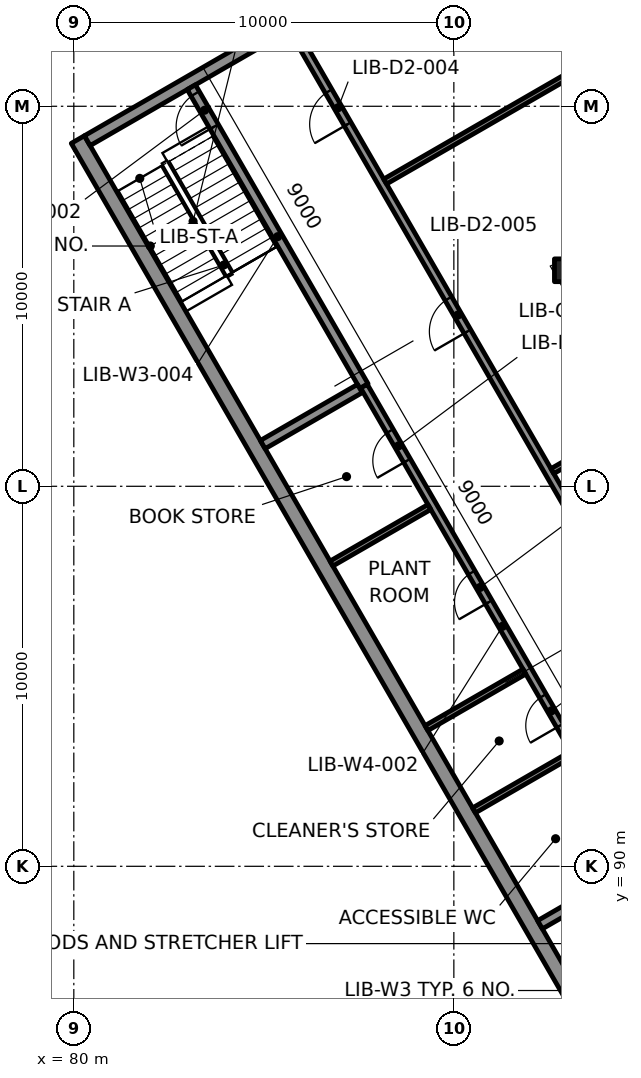
"""IFC4 building model, lengths in metres.
Left out: names, types, materials, properties, quantities, classifications, styles, units other than length and angle.
Written with IfcOpenShell. Run it as: python <this file> out.ifc"""

import sys

from ifc_helpers import new_model, si_unit, direction, frame, frame_2d, origin, origin_2d, place, context, subcontext, project, spatial, rectangle, extrude, element, fill, save


model = new_model("IFC4")
c1 = context("Model", 3, precision=1e-05, world=origin(), true_north=direction((0.0, 1.0)))
c2 = subcontext(c1, "Body", "Model", "MODEL_VIEW")
j1 = project(units=[si_unit("LENGTHUNIT", "METRE"), si_unit("PLANEANGLEUNIT", "RADIAN")], contexts=[c1])
p1 = place(None, origin())
s1 = spatial("IfcSite", under=j1, at=p1, CompositionType="ELEMENT")
p2 = place(p1, origin())
s2 = spatial("IfcBuilding", under=s1, at=p2, CompositionType="ELEMENT")
p3 = place(p2, frame((0.0, 0.0, 8.0)))
s3 = spatial("IfcBuildingStorey", under=s2, at=p3, CompositionType="ELEMENT", Elevation=8.0)
for number, where, z_axis, x_axis in (
    (1, (87.421, 93.256, -0.0), (0.0, 0.0, 1.0), (-0.5, 0.866, 0.0)),
    (2, (82.621, 101.57, -0.0), (0.0, 0.0, 1.0), (-0.5, 0.866, 0.0)),
):
    element("IfcColumn", number, at=place(p3, frame(where, z_axis=z_axis, x_axis=x_axis)), inside=s3, PredefinedType="COLUMN", context=c2, shape_type="SweptSolid", body=[
        extrude(rectangle(XDim=1.2, YDim=1.5, at=origin_2d()), origin(), (0.0, 0.0, 1.0), 4.601),
    ])
p4 = place(p3, frame((81.775, 87.5, 0.0), z_axis=(0.0, 0.0, 1.0), x_axis=(1.0, 0.0, 0.0)))
e3 = element("IfcWall", 3, at=p4, inside=s3, PredefinedType="PARTITIONING", context=c2, shape_type="SweptSolid", body=[
    extrude(rectangle(XDim=9.662, YDim=0.15, at=frame_2d((4.831, 0.0))), origin(), (0.0, 0.0, 1.0), 3.465),
])
p5 = place(p4, frame((4.381, 0.0, 0.0)))
e4 = element("IfcOpeningElement", 4, at=p5, cuts=e3, PredefinedType="OPENING", context=c2, shape_type="SweptSolid", body=[
    extrude(rectangle(XDim=0.9, YDim=2.1, at=frame_2d((0.45, 1.05))), frame((0.0, 0.085, 0.0), z_axis=(0.0, -1.0, 0.0), x_axis=(1.0, 0.0, 0.0)), (0.0, 0.0, 1.0), 0.17),
])
p6 = place(p3, frame((75.975, 98.1, 0.0), z_axis=(0.0, 0.0, 1.0), x_axis=(1.0, 0.0, 0.0)))
e5 = element("IfcWall", 5, at=p6, inside=s3, PredefinedType="PARTITIONING", context=c2, shape_type="SweptSolid", body=[
    extrude(rectangle(XDim=5.649, YDim=0.15, at=frame_2d((2.825, 0.0))), origin(), (0.0, 0.0, 1.0), 3.7),
])
p7 = place(p6, frame((2.375, 0.0, 0.0)))
e6 = element("IfcOpeningElement", 6, at=p7, cuts=e5, PredefinedType="OPENING", context=c2, shape_type="SweptSolid", body=[
    extrude(rectangle(XDim=0.9, YDim=2.1, at=frame_2d((0.45, 1.05))), frame((0.0, 0.085, 0.0), z_axis=(0.0, -1.0, 0.0), x_axis=(1.0, 0.0, 0.0)), (0.0, 0.0, 1.0), 0.17),
])
p8 = place(p3, frame((81.801, 92.783, 0.0), z_axis=(0.0, 0.0, 1.0), x_axis=(0.866019294229, 0.500010581911, 0.0)))
e7 = element("IfcWall", 7, at=p8, inside=s3, PredefinedType="PARTITIONING", context=c2, shape_type="SweptSolid", body=[
    extrude(rectangle(XDim=6.063, YDim=0.1, at=frame_2d((3.032, 0.0))), origin(), (0.0, 0.0, 1.0), 3.465),
])
p9 = place(p3, frame((91.5, 85.219, 0.0), z_axis=(0.0, 0.0, 1.0), x_axis=(0.0, 1.0, 0.0)))
e8 = element("IfcWall", 8, at=p9, inside=s3, PredefinedType="PARTITIONING", context=c2, shape_type="SweptSolid", body=[
    extrude(rectangle(XDim=2.17, YDim=0.15, at=frame_2d((1.085, 0.0))), origin(), (0.0, 0.0, 1.0), 3.465),
])
p10 = place(p3, frame((81.7, 87.5, 0.0), z_axis=(0.0, 0.0, 1.0), x_axis=(0.0, 1.0, 0.0)))
e9 = element("IfcWall", 9, at=p10, inside=s3, PredefinedType="PARTITIONING", context=c2, shape_type="SweptSolid", body=[
    extrude(rectangle(XDim=10.6, YDim=0.15, at=frame_2d((5.3, 0.0))), origin(), (0.0, 0.0, 1.0), 3.7),
])
p11 = place(p3, frame((92.947, 105.684, -0.36), z_axis=(0.0, 0.0, 1.0), x_axis=(1.0, 0.0, 0.0)))
e10 = element("IfcColumn", 10, at=p11, inside=s3, PredefinedType="COLUMN", context=c2, shape_type="SweptSolid", body=[
    extrude(rectangle(XDim=0.6, YDim=0.6, at=origin_2d()), origin(), (0.0, 0.0, 1.0), 4.6),
])
p12 = place(p3, frame((107.106, 62.36, 0.0), z_axis=(0.0, 0.0, 1.0), x_axis=(-0.49999992739, 0.866025445706, 0.0)))
e11 = element("IfcWall", 11, at=p12, inside=s3, PredefinedType="SOLIDWALL", context=c2, shape_type="SweptSolid", body=[
    extrude(rectangle(XDim=54.0, YDim=0.4, at=frame_2d((27.0, 0.0))), origin(), (0.0, 0.0, 1.0), 4.24),
])
p13 = place(p3, frame((80.354, 109.095, 0.0), z_axis=(0.0, 0.0, 1.0), x_axis=(0.866026568746, 0.499997982221, 0.0)))
e12 = element("IfcWall", 12, at=p13, inside=s3, PredefinedType="SOLIDWALL", context=c2, shape_type="SweptSolid", body=[
    extrude(rectangle(XDim=29.3, YDim=0.3, at=frame_2d((14.65, 0.0))), origin(), (0.0, 0.0, 1.0), 4.24),
])
p14 = place(p3, frame((87.635, 102.635, 0.0), z_axis=(0.0, 0.0, 1.0), x_axis=(-0.499994616197, 0.866028512102, 0.0)))
e13 = element("IfcWall", 13, at=p14, inside=s3, PredefinedType="SOLIDWALL", context=c2, shape_type="SweptSolid", body=[
    extrude(rectangle(XDim=9.085, YDim=0.25, at=frame_2d((4.542, 0.0))), origin(), (0.0, 0.0, 1.0), 4.24),
])
p15 = place(p14, frame((7.885, 0.0, 0.0)))
e14 = element("IfcOpeningElement", 14, at=p15, cuts=e13, PredefinedType="OPENING", context=c2, shape_type="SweptSolid", body=[
    extrude(rectangle(XDim=1.0, YDim=2.1, at=frame_2d((0.5, 1.05))), frame((0.0, 0.135, 0.0), z_axis=(0.0, -1.0, 0.0), x_axis=(1.0, 0.0, 0.0)), (0.0, 0.0, 1.0), 0.27),
])
p16 = place(p3, frame((94.93, 90.0, 0.0), z_axis=(0.0, 0.0, 1.0), x_axis=(-0.499997667785, 0.866026750285, 0.0)))
e15 = element("IfcWall", 15, at=p16, inside=s3, PredefinedType="PARTITIONING", context=c2, shape_type="SweptSolid", body=[
    extrude(rectangle(XDim=14.59, YDim=0.2, at=frame_2d((7.295, 0.0))), origin(), (0.0, 0.0, 1.0), 4.24),
])
p17 = place(p16, frame((1.235, 0.0, 0.0)))
e16 = element("IfcOpeningElement", 16, at=p17, cuts=e15, PredefinedType="OPENING", context=c2, shape_type="SweptSolid", body=[
    extrude(rectangle(XDim=1.0, YDim=2.1, at=frame_2d((0.5, 1.05))), frame((0.0, 0.11, 0.0), z_axis=(0.0, -1.0, 0.0), x_axis=(1.0, 0.0, 0.0)), (0.0, 0.0, 1.0), 0.22),
])
p18 = place(p16, frame((4.275, 0.0, 0.0)))
e17 = element("IfcOpeningElement", 17, at=p18, cuts=e15, PredefinedType="OPENING", context=c2, shape_type="SweptSolid", body=[
    extrude(rectangle(XDim=0.9, YDim=2.1, at=frame_2d((0.45, 1.05))), frame((0.0, 0.11, 0.0), z_axis=(0.0, -1.0, 0.0), x_axis=(1.0, 0.0, 0.0)), (0.0, 0.0, 1.0), 0.22),
])
p19 = place(p16, frame((8.025, 0.0, 0.0)))
e18 = element("IfcOpeningElement", 18, at=p19, cuts=e15, PredefinedType="OPENING", context=c2, shape_type="SweptSolid", body=[
    extrude(rectangle(XDim=0.9, YDim=2.1, at=frame_2d((0.45, 1.05))), frame((0.0, 0.11, 0.0), z_axis=(0.0, -1.0, 0.0), x_axis=(1.0, 0.0, 0.0)), (0.0, 0.0, 1.0), 0.22),
])
p20 = place(p16, frame((12.325, 0.0, 0.0)))
e19 = element("IfcOpeningElement", 19, at=p20, cuts=e15, PredefinedType="OPENING", context=c2, shape_type="SweptSolid", body=[
    extrude(rectangle(XDim=0.9, YDim=2.1, at=frame_2d((0.45, 1.05))), frame((0.0, 0.11, 0.0), z_axis=(0.0, -1.0, 0.0), x_axis=(1.0, 0.0, 0.0)), (0.0, 0.0, 1.0), 0.22),
])
p21 = place(p3, frame((92.267, 88.462, 0.0), z_axis=(0.0, 0.0, 1.0), x_axis=(0.866024349092, 0.500001826776, 0.0)))
e20 = element("IfcWall", 20, at=p21, inside=s3, PredefinedType="SOLIDWALL", context=c2, shape_type="SweptSolid", body=[
    extrude(rectangle(XDim=2.95, YDim=0.25, at=frame_2d((1.475, 0.0))), origin(), (0.0, 0.0, 1.0), 4.24),
])
for number, where, z_axis, x_axis in (
    (21, (90.529, 91.471, 0.0), (0.0, 0.0, 1.0), (0.866, 0.5, 0.0)),
    (22, (89.279, 93.636, 0.0), (0.0, 0.0, 1.0), (0.866, 0.5, 0.0)),
):
    element("IfcWall", number, at=place(p3, frame(where, z_axis=z_axis, x_axis=x_axis)), inside=s3, PredefinedType="PARTITIONING", context=c2, shape_type="SweptSolid", body=[
        extrude(rectangle(XDim=2.975, YDim=0.15, at=frame_2d((1.488, 0.0))), origin(), (0.0, 0.0, 1.0), 4.24),
    ])
p22 = place(p3, frame((86.779, 97.967, 0.0), z_axis=(0.0, 0.0, 1.0), x_axis=(0.866053027861, 0.499952150643, 0.0)))
e23 = element("IfcWall", 23, at=p22, inside=s3, PredefinedType="PARTITIONING", context=c2, shape_type="SweptSolid", body=[
    extrude(rectangle(XDim=2.975, YDim=0.15, at=frame_2d((1.487, 0.0))), origin(), (0.0, 0.0, 1.0), 4.24),
])
p23 = place(p3, frame((84.972, 101.097, 0.0), z_axis=(0.0, 0.0, 1.0), x_axis=(0.866039495442, 0.49997559174, 0.0)))
e24 = element("IfcWall", 24, at=p23, inside=s3, PredefinedType="SOLIDWALL", context=c2, shape_type="SweptSolid", body=[
    extrude(rectangle(XDim=2.95, YDim=0.25, at=frame_2d((1.475, 0.0))), origin(), (0.0, 0.0, 1.0), 4.24),
])
p24 = place(p3, frame((112.496, 65.725, 0.0), z_axis=(0.0, 0.0, 1.0), x_axis=(-0.499998673217, 0.866026169802, 0.0)))
e25 = element("IfcWall", 25, at=p24, inside=s3, PredefinedType="PARTITIONING", context=c2, shape_type="SweptSolid", body=[
    extrude(rectangle(XDim=53.48, YDim=0.2, at=frame_2d((26.74, 0.0))), origin(), (0.0, 0.0, 1.0), 4.24),
])
p25 = place(p24, frame((13.08, 0.0, 0.0)))
e26 = element("IfcOpeningElement", 26, at=p25, cuts=e25, PredefinedType="OPENING", context=c2, shape_type="SweptSolid", body=[
    extrude(rectangle(XDim=1.0, YDim=2.1, at=frame_2d((0.5, 1.05))), frame((0.0, 0.11, 0.0), z_axis=(0.0, -1.0, 0.0), x_axis=(1.0, 0.0, 0.0)), (0.0, 0.0, 1.0), 0.22),
])
p26 = place(p24, frame((25.88, 0.0, 0.0)))
e27 = element("IfcOpeningElement", 27, at=p26, cuts=e25, PredefinedType="OPENING", context=c2, shape_type="SweptSolid", body=[
    extrude(rectangle(XDim=1.8, YDim=2.1, at=frame_2d((0.9, 1.05))), frame((0.0, 0.11, 0.0), z_axis=(0.0, -1.0, 0.0), x_axis=(1.0, 0.0, 0.0)), (0.0, 0.0, 1.0), 0.22),
])
p27 = place(p24, frame((50.58, 0.0, 0.0)))
e28 = element("IfcOpeningElement", 28, at=p27, cuts=e25, PredefinedType="OPENING", context=c2, shape_type="SweptSolid", body=[
    extrude(rectangle(XDim=1.0, YDim=2.1, at=frame_2d((0.5, 1.05))), frame((0.0, 0.11, 0.0), z_axis=(0.0, -1.0, 0.0), x_axis=(1.0, 0.0, 0.0)), (0.0, 0.0, 1.0), 0.22),
])
p28 = place(p24, frame((44.28, 0.0, 0.0)))
e29 = element("IfcOpeningElement", 29, at=p28, cuts=e25, PredefinedType="OPENING", context=c2, shape_type="SweptSolid", body=[
    extrude(rectangle(XDim=1.0, YDim=2.1, at=frame_2d((0.5, 1.05))), frame((0.0, 0.11, 0.0), z_axis=(0.0, -1.0, 0.0), x_axis=(1.0, 0.0, 0.0)), (0.0, 0.0, 1.0), 0.22),
])
for number, where, z_axis, x_axis in (
    (30, (92.592, 100.399, 0.0), (0.0, 0.0, 1.0), (0.866, 0.5, 0.0)),
    (31, (88.192, 108.02, 0.0), (0.0, 0.0, 1.0), (0.866, 0.5, 0.0)),
):
    element("IfcWall", number, at=place(p3, frame(where, z_axis=z_axis, x_axis=x_axis)), inside=s3, PredefinedType="PARTITIONING", context=c2, shape_type="SweptSolid", body=[
        extrude(rectangle(XDim=23.05, YDim=0.15, at=frame_2d((11.525, 0.0))), origin(), (0.0, 0.0, 1.0), 4.24),
    ])
p29 = place(p5, origin())
e32 = element("IfcDoor", 32, at=p29, inside=s3, OperationType="SINGLE_SWING_LEFT", PredefinedType="DOOR", context=c2, shape_type="SweptSolid", body=[
    extrude(rectangle(XDim=0.9, YDim=2.1, at=frame_2d((0.45, 1.05))), frame((0.0, 0.025, 0.0), z_axis=(0.0, -1.0, 0.0), x_axis=(1.0, 0.0, 0.0)), (0.0, 0.0, 1.0), 0.05),
])
fill(e4, e32)
p30 = place(p15, origin())
e33 = element("IfcDoor", 33, at=p30, inside=s3, OperationType="SINGLE_SWING_RIGHT", PredefinedType="DOOR", context=c2, shape_type="SweptSolid", body=[
    extrude(rectangle(XDim=1.0, YDim=2.1, at=frame_2d((0.5, 1.05))), frame((0.0, 0.025, 0.0), z_axis=(0.0, -1.0, 0.0), x_axis=(1.0, 0.0, 0.0)), (0.0, 0.0, 1.0), 0.05),
])
fill(e14, e33)
p31 = place(p18, origin())
e34 = element("IfcDoor", 34, at=p31, inside=s3, OperationType="SINGLE_SWING_RIGHT", PredefinedType="DOOR", context=c2, shape_type="SweptSolid", body=[
    extrude(rectangle(XDim=0.9, YDim=2.1, at=frame_2d((0.45, 1.05))), frame((0.0, 0.025, 0.0), z_axis=(0.0, -1.0, 0.0), x_axis=(1.0, 0.0, 0.0)), (0.0, 0.0, 1.0), 0.05),
])
fill(e17, e34)
p32 = place(p19, origin())
e35 = element("IfcDoor", 35, at=p32, inside=s3, OperationType="SINGLE_SWING_RIGHT", PredefinedType="DOOR", context=c2, shape_type="SweptSolid", body=[
    extrude(rectangle(XDim=0.9, YDim=2.1, at=frame_2d((0.45, 1.05))), frame((0.0, 0.025, 0.0), z_axis=(0.0, -1.0, 0.0), x_axis=(1.0, 0.0, 0.0)), (0.0, 0.0, 1.0), 0.05),
])
fill(e18, e35)
p33 = place(p20, origin())
e36 = element("IfcDoor", 36, at=p33, inside=s3, OperationType="SINGLE_SWING_LEFT", PredefinedType="DOOR", context=c2, shape_type="SweptSolid", body=[
    extrude(rectangle(XDim=0.9, YDim=2.1, at=frame_2d((0.45, 1.05))), frame((0.0, 0.025, 0.0), z_axis=(0.0, -1.0, 0.0), x_axis=(1.0, 0.0, 0.0)), (0.0, 0.0, 1.0), 0.05),
])
fill(e19, e36)
p34 = place(p27, origin())
e37 = element("IfcDoor", 37, at=p34, inside=s3, OperationType="SINGLE_SWING_LEFT", PredefinedType="DOOR", context=c2, shape_type="SweptSolid", body=[
    extrude(rectangle(XDim=1.0, YDim=2.1, at=frame_2d((0.5, 1.05))), frame((0.0, 0.025, 0.0), z_axis=(0.0, -1.0, 0.0), x_axis=(1.0, 0.0, 0.0)), (0.0, 0.0, 1.0), 0.05),
])
fill(e28, e37)
p35 = place(p28, origin())
e38 = element("IfcDoor", 38, at=p35, inside=s3, OperationType="SINGLE_SWING_RIGHT", PredefinedType="DOOR", context=c2, shape_type="SweptSolid", body=[
    extrude(rectangle(XDim=1.0, YDim=2.1, at=frame_2d((0.5, 1.05))), frame((0.0, 0.025, 0.0), z_axis=(0.0, -1.0, 0.0), x_axis=(1.0, 0.0, 0.0)), (0.0, 0.0, 1.0), 0.05),
])
fill(e29, e38)
save(model, sys.argv[1])
